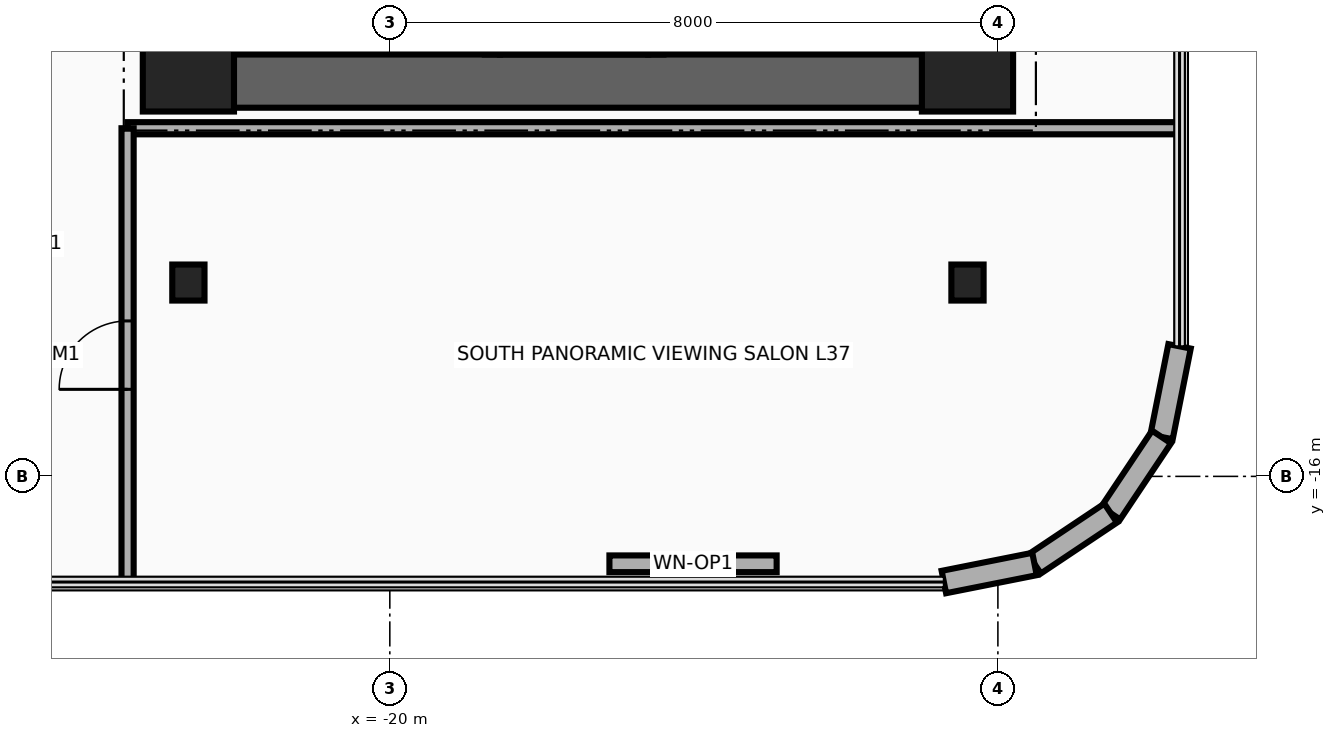
"""IFC4 building model, lengths in metres.
Left out: names, types, materials, properties, quantities, classifications, styles, units other than length and angle.
Written with IfcOpenShell. Run it as: python <this file> out.ifc"""

import sys

from ifc_helpers import new_model, si_unit, direction, frame, frame_2d, origin, origin_2d, place, context, subcontext, project, spatial, rectangle, i_section, extrude, source, transform, mapped, element, fill, save


model = new_model("IFC4")
c1 = context("Model", 3, precision=1e-05, world=origin(), true_north=direction((0.0, 1.0)))
c2 = subcontext(c1, "Body", "Model", "MODEL_VIEW")
j1 = project(units=[si_unit("LENGTHUNIT", "METRE"), si_unit("PLANEANGLEUNIT", "RADIAN")], contexts=[c1])
p1 = place(None, origin())
s1 = spatial("IfcSite", under=j1, at=p1, CompositionType="ELEMENT")
p2 = place(p1, origin())
s2 = spatial("IfcBuilding", under=s1, at=p2, CompositionType="ELEMENT")
p3 = place(p2, frame((0.0, 0.0, 146.4)))
s3 = spatial("IfcBuildingStorey", under=s2, at=p3, CompositionType="ELEMENT", Elevation=146.4)
for number, where, z_axis, x_axis in (
    (1, (-22.16, -10.45, 0.0), (0.0, 0.0, 1.0), (0.0, 1.0, 0.0)),
    (2, (-18.83, -10.45, 0.0), (0.0, 0.0, 1.0), (0.0, 1.0, 0.0)),
):
    element("IfcWall", number, at=place(p3, frame(where, z_axis=z_axis, x_axis=x_axis)), inside=s3, PredefinedType="SHEAR", context=c2, shape_type="SweptSolid", body=[
        extrude(rectangle(XDim=8.67, YDim=0.22, at=frame_2d((4.335, 0.0))), origin(), (0.0, 0.0, 1.0), 3.46),
    ])
p4 = place(p3, frame((-22.65, -11.15, 0.0), z_axis=(0.0, 0.0, 1.0), x_axis=(0.0, 1.0, 0.0)))
e3 = element("IfcWall", 3, at=p4, inside=s3, PredefinedType="SHEAR", context=c2, shape_type="SweptSolid", body=[
    extrude(rectangle(XDim=22.3, YDim=0.7, at=frame_2d((11.15, 0.0))), origin(), (0.0, 0.0, 1.0), 3.46),
])
p5 = place(p3, frame((-22.65, -10.8, 0.0), z_axis=(0.0, 0.0, 1.0), x_axis=(1.0, 0.0, 0.0)))
e4 = element("IfcWall", 4, at=p5, inside=s3, PredefinedType="SHEAR", context=c2, shape_type="SweptSolid", body=[
    extrude(rectangle(XDim=10.25, YDim=0.7, at=frame_2d((5.125, 0.0))), origin(), (0.0, 0.0, 1.0), 3.46),
])
m1 = source(origin(), c2, "Body", "SweptSolid", [
    extrude(rectangle(XDim=1.2, YDim=1.2, at=origin_2d()), origin(), (0.0, 0.0, 1.0), 3.7),
])
for number, where, z_axis, x_axis in (
    (5, (-22.65, -10.6, 0.0), (0.0, 0.0, 1.0), (1.0, 0.0, 0.0)),
    (6, (-12.4, -10.6, 0.0), (0.0, 0.0, 1.0), (1.0, 0.0, 0.0)),
):
    element("IfcColumn", number, at=place(p3, frame(where, z_axis=z_axis, x_axis=x_axis)), inside=s3, PredefinedType="COLUMN", context=c2, shape_type="MappedRepresentation", body=[
        mapped(m1, transform((0.0, 0.0, 0.0), x_axis=(1.0, 0.0, 0.0), y_axis=(0.0, 1.0, 0.0), z_axis=(0.0, 0.0, 1.0), scale=1.0)),
    ])
m2 = source(origin(), c2, "Body", "SweptSolid", [
    extrude(i_section(OverallWidth=0.424, OverallDepth=0.474, WebThickness=0.048, FlangeThickness=0.077, at=origin_2d()), origin(), (0.0, 0.0, 1.0), 3.7),
])
for number, where, z_axis, x_axis in (
    (7, (-22.65, -13.45, 0.0), (0.0, 0.0, 1.0), (1.0, 0.0, 0.0)),
    (8, (-12.4, -13.45, 0.0), (0.0, 0.0, 1.0), (1.0, 0.0, 0.0)),
):
    element("IfcColumn", number, at=place(p3, frame(where, z_axis=z_axis, x_axis=x_axis)), inside=s3, PredefinedType="COLUMN", context=c2, shape_type="MappedRepresentation", body=[
        mapped(m2, transform((0.0, 0.0, 0.0), x_axis=(1.0, 0.0, 0.0), y_axis=(0.0, 1.0, 0.0), z_axis=(0.0, 0.0, 1.0), scale=1.0)),
    ])
p6 = place(p3, frame((-9.61, -14.289, 0.0), z_axis=(0.0, 0.0, 1.0), x_axis=(-0.194996050505, -0.980804027463, 0.0)))
e9 = element("IfcWall", 9, at=p6, inside=s3, PredefinedType="SOLIDWALL", context=c2, shape_type="SweptSolid", body=[
    extrude(rectangle(XDim=1.216, YDim=0.3, at=frame_2d((0.608, 0.0))), origin(), (0.0, 0.0, 1.0), 3.46),
])
for number, where, z_axis, x_axis in (
    (10, (-9.847, -15.482, 0.0), (0.0, 0.0, 1.0), (-0.556, -0.831, 0.0)),
    (11, (-10.517, -16.483, 0.0), (0.0, 0.0, 1.0), (-0.831, -0.556, 0.0)),
):
    element("IfcWall", number, at=place(p3, frame(where, z_axis=z_axis, x_axis=x_axis)), inside=s3, PredefinedType="SOLIDWALL", context=c2, shape_type="SweptSolid", body=[
        extrude(rectangle(XDim=1.205, YDim=0.3, at=frame_2d((0.603, 0.0))), origin(), (0.0, 0.0, 1.0), 3.46),
    ])
p7 = place(p3, frame((-11.518, -17.153, 0.0), z_axis=(0.0, 0.0, 1.0), x_axis=(-0.980804027463, -0.194996050505, 0.0)))
e12 = element("IfcWall", 12, at=p7, inside=s3, PredefinedType="SOLIDWALL", context=c2, shape_type="SweptSolid", body=[
    extrude(rectangle(XDim=1.216, YDim=0.3, at=frame_2d((0.608, 0.0))), origin(), (0.0, 0.0, 1.0), 3.46),
])
p8 = place(p3, frame((-14.911, -17.15, 0.0), z_axis=(0.0, 0.0, 1.0), x_axis=(-1.0, 0.0, 0.0)))
e13 = element("IfcWall", 13, at=p8, inside=s3, PredefinedType="SOLIDWALL", context=c2, shape_type="SweptSolid", body=[
    extrude(rectangle(XDim=2.2, YDim=0.22, at=frame_2d((1.1, 0.0))), origin(), (0.0, 0.0, 1.0), 3.46),
])
p9 = place(p8, frame((0.65, 0.0, 0.95)))
e14 = element("IfcOpeningElement", 14, at=p9, cuts=e13, PredefinedType="OPENING", context=c2, shape_type="SweptSolid", body=[
    extrude(rectangle(XDim=0.9, YDim=1.3, at=frame_2d((0.45, 0.65))), frame((0.0, 0.125, 0.0), z_axis=(0.0, -1.0, 0.0), x_axis=(1.0, 0.0, 0.0)), (0.0, 0.0, 1.0), 0.25),
])
for number, where, z_axis, x_axis in (
    (15, (-18.65, -10.45, 0.0), (0.0, 0.0, 1.0), (0.0, 1.0, 0.0)),
    (16, (-16.5, -10.45, 0.0), (0.0, 0.0, 1.0), (0.0, 1.0, 0.0)),
):
    element("IfcWall", number, at=place(p3, frame(where, z_axis=z_axis, x_axis=x_axis)), inside=s3, PredefinedType="MOVABLE", context=c2, shape_type="SweptSolid", body=[
        extrude(rectangle(XDim=2.35, YDim=0.2, at=frame_2d((1.175, 0.0))), origin(), (0.0, 0.0, 1.0), 2.666),
    ])
p10 = place(p3, frame((-18.55, -10.35, 0.0), z_axis=(0.0, 0.0, 1.0), x_axis=(1.0, 0.0, 0.0)))
e17 = element("IfcWall", 17, at=p10, inside=s3, PredefinedType="MOVABLE", context=c2, shape_type="SweptSolid", body=[
    extrude(rectangle(XDim=1.95, YDim=0.2, at=frame_2d((0.975, 0.0))), origin(), (0.0, 0.0, 1.0), 2.666),
])
p11 = place(p3, frame((-23.45, -11.42, 0.0), z_axis=(0.0, 0.0, 1.0), x_axis=(1.0, 0.0, 0.0)))
e18 = element("IfcWall", 18, at=p11, inside=s3, PredefinedType="PARTITIONING", context=c2, shape_type="SweptSolid", body=[
    extrude(rectangle(XDim=13.84, YDim=0.16, at=frame_2d((6.92, 0.0))), origin(), (0.0, 0.0, 1.0), 2.834),
])
p12 = place(p3, frame((-23.45, -17.39, 0.0), z_axis=(0.0, 0.0, 1.0), x_axis=(0.0, 1.0, 0.0)))
e19 = element("IfcWall", 19, at=p12, inside=s3, PredefinedType="PARTITIONING", context=c2, shape_type="SweptSolid", body=[
    extrude(rectangle(XDim=5.97, YDim=0.16, at=frame_2d((2.985, 0.0))), origin(), (0.0, 0.0, 1.0), 3.46),
])
p13 = place(p12, frame((2.535, 0.0, 0.0)))
e20 = element("IfcOpeningElement", 20, at=p13, cuts=e19, PredefinedType="OPENING", context=c2, shape_type="SweptSolid", body=[
    extrude(rectangle(XDim=0.9, YDim=2.1, at=frame_2d((0.45, 1.05))), frame((0.0, 0.095, 0.0), z_axis=(0.0, -1.0, 0.0), x_axis=(1.0, 0.0, 0.0)), (0.0, 0.0, 1.0), 0.19),
])
p14 = place(p9, origin())
e21 = element("IfcWindow", 21, at=p14, inside=s3, PartitioningType="SINGLE_PANEL", PredefinedType="WINDOW", context=c2, shape_type="SweptSolid", body=[
    extrude(rectangle(XDim=0.9, YDim=1.3, at=frame_2d((0.45, 0.65))), frame((0.0, 0.03, 0.0), z_axis=(0.0, -1.0, 0.0), x_axis=(1.0, 0.0, 0.0)), (0.0, 0.0, 1.0), 0.06),
])
fill(e14, e21)
p15 = place(p13, origin())
e22 = element("IfcDoor", 22, at=p15, inside=s3, OperationType="SINGLE_SWING_RIGHT", PredefinedType="DOOR", context=c2, shape_type="SweptSolid", body=[
    extrude(rectangle(XDim=0.9, YDim=2.1, at=frame_2d((0.45, 1.05))), frame((0.0, 0.025, 0.0), z_axis=(0.0, -1.0, 0.0), x_axis=(1.0, 0.0, 0.0)), (0.0, 0.0, 1.0), 0.05),
])
fill(e20, e22)
save(model, sys.argv[1])
